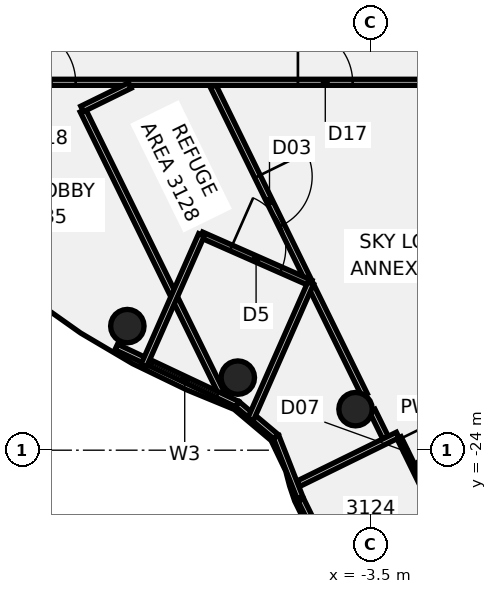
"""IFC4 building model, lengths in metres.
Left out: names, types, materials, properties, quantities, classifications, styles, units other than length and angle.
Written with IfcOpenShell. Run it as: python <this file> out.ifc"""

import sys

from ifc_helpers import new_model, si_unit, direction, frame, frame_2d, origin, origin_2d, place, context, subcontext, project, spatial, rectangle, circle, extrude, element, fill, save


model = new_model("IFC4")
c1 = context("Model", 3, precision=1e-05, world=origin(), true_north=direction((0.0, 1.0)))
c2 = subcontext(c1, "Body", "Model", "MODEL_VIEW")
j1 = project(units=[si_unit("LENGTHUNIT", "METRE"), si_unit("PLANEANGLEUNIT", "RADIAN")], contexts=[c1])
p1 = place(None, origin())
s1 = spatial("IfcSite", under=j1, at=p1, CompositionType="ELEMENT")
p2 = place(p1, origin())
s2 = spatial("IfcBuilding", under=s1, at=p2, CompositionType="ELEMENT")
p3 = place(p2, frame((0.0, 0.0, 128.5)))
s3 = spatial("IfcBuildingStorey", under=s2, at=p3, CompositionType="ELEMENT", Elevation=128.5)
for number, where, z_axis, x_axis in (
    (1, (-11.5, -19.919, -0.18), (0.0, 0.0, 1.0), (1.0, 0.0, 0.0)),
    (2, (-7.866, -21.613, -0.18), (0.0, 0.0, 1.0), (1.0, 0.0, 0.0)),
    (3, (-3.994, -22.651, -0.18), (0.0, 0.0, 1.0), (1.0, 0.0, 0.0)),
):
    element("IfcColumn", number, at=place(p3, frame(where, z_axis=z_axis, x_axis=x_axis)), inside=s3, PredefinedType="COLUMN", context=c2, shape_type="SweptSolid", body=[
        extrude(circle(Radius=0.55, at=origin_2d()), origin(), (0.0, 0.0, 1.0), 4.54),
    ])
p4 = place(p3, frame((-12.961, -12.83, 0.0), z_axis=(0.0, 0.0, 1.0), x_axis=(0.44020582269, -0.897896894788, 0.0)))
e4 = element("IfcWall", 4, at=p4, inside=s3, PredefinedType="PARTITIONING", context=c2, shape_type="SweptSolid", body=[
    extrude(rectangle(XDim=10.402, YDim=0.2, at=frame_2d((5.201, 0.0))), origin(), (0.0, 0.0, 1.0), 3.66),
])
p5 = place(p3, frame((-8.677, -12.026, 0.0), z_axis=(0.0, 0.0, 1.0), x_axis=(0.440258895861, -0.897870873018, 0.0)))
e5 = element("IfcWall", 5, at=p5, inside=s3, PredefinedType="PARTITIONING", context=c2, shape_type="SweptSolid", body=[
    extrude(rectangle(XDim=11.312, YDim=0.2, at=frame_2d((5.656, 0.0))), origin(), (0.0, 0.0, 1.0), 3.66),
])
p6 = place(p5, frame((3.31, 0.0, 0.0)))
e6 = element("IfcOpeningElement", 6, at=p6, cuts=e5, PredefinedType="OPENING", context=c2, shape_type="SweptSolid", body=[
    extrude(rectangle(XDim=1.8, YDim=2.1, at=frame_2d((0.9, 1.05))), frame((0.0, 0.11, 0.0), z_axis=(0.0, -1.0, 0.0), x_axis=(1.0, 0.0, 0.0)), (0.0, 0.0, 1.0), 0.22),
])
p7 = place(p3, frame((-3.446, -22.695, 0.0), z_axis=(0.0, 0.0, 1.0), x_axis=(0.440211677145, -0.89789402454, 0.0)))
e7 = element("IfcWall", 7, at=p7, inside=s3, PredefinedType="PARTITIONING", context=c2, shape_type="SweptSolid", body=[
    extrude(rectangle(XDim=0.992, YDim=0.2, at=frame_2d((0.496, 0.0))), origin(), (0.0, 0.0, 1.0), 3.66),
])
p8 = place(p3, frame((-2.562, -23.59, 0.0), z_axis=(0.0, 0.0, 1.0), x_axis=(0.440221907821, -0.897889008661, 0.0)))
e8 = element("IfcWall", 8, at=p8, inside=s3, PredefinedType="PARTITIONING", context=c2, shape_type="SweptSolid", body=[
    extrude(rectangle(XDim=3.401, YDim=0.15, at=frame_2d((1.7, 0.0))), origin(), (0.0, 0.0, 1.0), 3.66),
])
p9 = place(p8, frame((0.05, 0.0, 0.0)))
e9 = element("IfcOpeningElement", 9, at=p9, cuts=e8, PredefinedType="OPENING", context=c2, shape_type="SweptSolid", body=[
    extrude(rectangle(XDim=0.9, YDim=2.1, at=frame_2d((0.45, 1.05))), frame((0.0, 0.085, 0.0), z_axis=(0.0, -1.0, 0.0), x_axis=(1.0, 0.0, 0.0)), (0.0, 0.0, 1.0), 0.17),
])
p10 = place(p3, frame((-17.1, -11.9, 0.0), z_axis=(0.0, 0.0, 1.0), x_axis=(1.0, 0.0, 0.0)))
e10 = element("IfcWall", 10, at=p10, inside=s3, PredefinedType="PARTITIONING", context=c2, shape_type="SweptSolid", body=[
    extrude(rectangle(XDim=34.145, YDim=0.2, at=frame_2d((17.073, 0.0))), origin(), (0.0, 0.0, 1.0), 3.66),
])
p11 = place(p10, frame((11.211, 0.0, 0.0)))
e11 = element("IfcOpeningElement", 11, at=p11, cuts=e10, PredefinedType="OPENING", context=c2, shape_type="SweptSolid", body=[
    extrude(rectangle(XDim=1.8, YDim=2.1, at=frame_2d((0.9, 1.05))), frame((0.0, 0.11, 0.0), z_axis=(0.0, -1.0, 0.0), x_axis=(1.0, 0.0, 0.0)), (0.0, 0.0, 1.0), 0.22),
])
p12 = place(p10, frame((2.1, 0.0, 0.0)))
e12 = element("IfcOpeningElement", 12, at=p12, cuts=e10, PredefinedType="OPENING", context=c2, shape_type="SweptSolid", body=[
    extrude(rectangle(XDim=1.8, YDim=2.1, at=frame_2d((0.9, 1.05))), frame((0.0, 0.11, 0.0), z_axis=(0.0, -1.0, 0.0), x_axis=(1.0, 0.0, 0.0)), (0.0, 0.0, 1.0), 0.22),
])
p13 = place(p10, frame((26.462, 0.0, 0.0)))
e13 = element("IfcOpeningElement", 13, at=p13, cuts=e10, PredefinedType="OPENING", context=c2, shape_type="SweptSolid", body=[
    extrude(rectangle(XDim=1.8, YDim=2.1, at=frame_2d((0.9, 1.05))), frame((0.0, 0.11, 0.0), z_axis=(0.0, -1.0, 0.0), x_axis=(1.0, 0.0, 0.0)), (0.0, 0.0, 1.0), 0.22),
])
p14 = place(p3, frame((-12.987, -12.776, 0.0), z_axis=(0.0, 0.0, 1.0), x_axis=(0.897834179061, 0.440333722204, 0.0)))
e14 = element("IfcWall", 14, at=p14, inside=s3, PredefinedType="PARTITIONING", context=c2, shape_type="SweptSolid", body=[
    extrude(rectangle(XDim=1.749, YDim=0.2, at=frame_2d((0.875, 0.0))), origin(), (0.0, 0.0, 1.0), 3.66),
])
p15 = place(p3, frame((-5.87, -25.102, 0.0), z_axis=(0.0, 0.0, 1.0), x_axis=(0.897759350726, 0.440486263333, 0.0)))
e15 = element("IfcWall", 15, at=p15, inside=s3, PredefinedType="PARTITIONING", context=c2, shape_type="SweptSolid", body=[
    extrude(rectangle(XDim=3.636, YDim=0.2, at=frame_2d((1.818, 0.0))), origin(), (0.0, 0.0, 1.0), 3.66),
])
p16 = place(p3, frame((-4.342, -28.361, 0.0), z_axis=(0.0, 0.0, 1.0), x_axis=(0.89785648862, 0.440288230416, 0.0)))
e16 = element("IfcWall", 16, at=p16, inside=s3, PredefinedType="PARTITIONING", context=c2, shape_type="SweptSolid", body=[
    extrude(rectangle(XDim=14.199, YDim=0.2, at=frame_2d((7.1, 0.0))), origin(), (0.0, 0.0, 1.0), 3.66),
])
p17 = place(p16, frame((5.8, 0.0, 0.0)))
e17 = element("IfcOpeningElement", 17, at=p17, cuts=e16, PredefinedType="OPENING", context=c2, shape_type="SweptSolid", body=[
    extrude(rectangle(XDim=1.4, YDim=2.1, at=frame_2d((0.7, 1.05))), frame((0.0, 0.11, 0.0), z_axis=(0.0, -1.0, 0.0), x_axis=(1.0, 0.0, 0.0)), (0.0, 0.0, 1.0), 0.22),
])
p18 = place(p3, frame((-2.01, -24.545, 0.0), z_axis=(0.0, 0.0, 1.0), x_axis=(0.897737840771, 0.440530100275, 0.0)))
e18 = element("IfcWall", 18, at=p18, inside=s3, PredefinedType="PARTITIONING", context=c2, shape_type="SweptSolid", body=[
    extrude(rectangle(XDim=1.625, YDim=0.15, at=frame_2d((0.812, 0.0))), origin(), (0.0, 0.0, 1.0), 3.66),
])
p19 = place(p3, frame((-11.865, -20.605, 0.0), z_axis=(0.0, 0.0, 1.0), x_axis=(0.904385974053, -0.426715373448, 0.0)))
e19 = element("IfcWall", 19, at=p19, inside=s3, PredefinedType="SOLIDWALL", context=c2, shape_type="SweptSolid", body=[
    extrude(rectangle(XDim=4.403, YDim=0.2, at=frame_2d((2.202, 0.0))), origin(), (0.0, 0.0, 1.0), 4.36),
])
p20 = place(p19, frame((1.29, 0.0, 1.4)))
e20 = element("IfcOpeningElement", 20, at=p20, cuts=e19, PredefinedType="OPENING", context=c2, shape_type="SweptSolid", body=[
    extrude(rectangle(XDim=2.4, YDim=2.1, at=frame_2d((1.2, 1.05))), frame((0.0, 0.11, 0.0), z_axis=(0.0, -1.0, 0.0), x_axis=(1.0, 0.0, 0.0)), (0.0, 0.0, 1.0), 0.22),
])
p21 = place(p3, frame((-7.882, -22.484, 0.0), z_axis=(0.0, 0.0, 1.0), x_axis=(0.765040402091, -0.643982284825, 0.0)))
e21 = element("IfcWall", 21, at=p21, inside=s3, PredefinedType="SOLIDWALL", context=c2, shape_type="SweptSolid", body=[
    extrude(rectangle(XDim=1.666, YDim=0.2, at=frame_2d((0.833, 0.0))), origin(), (0.0, 0.0, 1.0), 4.36),
])
p22 = place(p3, frame((-6.608, -23.557, 0.0), z_axis=(0.0, 0.0, 1.0), x_axis=(0.364931951145, -0.931034194342, 0.0)))
e22 = element("IfcWall", 22, at=p22, inside=s3, PredefinedType="SOLIDWALL", context=c2, shape_type="SweptSolid", body=[
    extrude(rectangle(XDim=2.16, YDim=0.2, at=frame_2d((1.08, 0.0))), origin(), (0.0, 0.0, 1.0), 4.36),
])
p23 = place(p3, frame((-5.792, -25.632, 0.0), z_axis=(0.0, 0.0, 1.0), x_axis=(0.440299885466, -0.897850773157, 0.0)))
e23 = element("IfcWall", 23, at=p23, inside=s3, PredefinedType="SOLIDWALL", context=c2, shape_type="SweptSolid", body=[
    extrude(rectangle(XDim=3.057, YDim=0.2, at=frame_2d((1.528, 0.0))), origin(), (0.0, 0.0, 1.0), 4.36),
])
p24 = place(p3, frame((-9.061, -16.918, 0.0), z_axis=(0.0, 0.0, 1.0), x_axis=(0.914869848832, -0.403748881978, 0.0)))
e24 = element("IfcWall", 24, at=p24, inside=s3, PredefinedType="SOLIDWALL", context=c2, shape_type="SweptSolid", body=[
    extrude(rectangle(XDim=3.927, YDim=0.2, at=frame_2d((1.963, 0.0))), origin(), (0.0, 0.0, 1.0), 4.36),
])
p25 = place(p24, frame((1.063, 0.0, 0.0)))
e25 = element("IfcOpeningElement", 25, at=p25, cuts=e24, PredefinedType="OPENING", context=c2, shape_type="SweptSolid", body=[
    extrude(rectangle(XDim=1.8, YDim=2.4, at=frame_2d((0.9, 1.2))), frame((0.0, 0.11, 0.0), z_axis=(0.0, -1.0, 0.0), x_axis=(1.0, 0.0, 0.0)), (0.0, 0.0, 1.0), 0.22),
])
p26 = place(p3, frame((-9.062, -16.918, 0.0), z_axis=(0.0, 0.0, 1.0), x_axis=(-0.403733506443, -0.914876634184, 0.0)))
e26 = element("IfcWall", 26, at=p26, inside=s3, PredefinedType="SOLIDWALL", context=c2, shape_type="SweptSolid", body=[
    extrude(rectangle(XDim=4.703, YDim=0.2, at=frame_2d((2.352, 0.0))), origin(), (0.0, 0.0, 1.0), 4.36),
])
p27 = place(p3, frame((-5.469, -18.503, 0.0), z_axis=(0.0, 0.0, 1.0), x_axis=(-0.403691721509, -0.914895072664, 0.0)))
e27 = element("IfcWall", 27, at=p27, inside=s3, PredefinedType="SOLIDWALL", context=c2, shape_type="SweptSolid", body=[
    extrude(rectangle(XDim=4.9, YDim=0.2, at=frame_2d((2.45, 0.0))), origin(), (0.0, 0.0, 1.0), 4.36),
])
p28 = place(p6, frame((1.8, 0.0, 0.0), z_axis=(0.0, 0.0, 1.0), x_axis=(-1.0, 0.0, 0.0)))
e28 = element("IfcDoor", 28, at=p28, inside=s3, OperationType="DOUBLE_DOOR_SINGLE_SWING", PredefinedType="DOOR", context=c2, shape_type="SweptSolid", body=[
    extrude(rectangle(XDim=1.8, YDim=2.1, at=frame_2d((0.9, 1.05))), frame((0.0, 0.025, 0.0), z_axis=(0.0, -1.0, 0.0), x_axis=(1.0, 0.0, 0.0)), (0.0, 0.0, 1.0), 0.05),
])
fill(e6, e28)
p29 = place(p9, frame((0.9, 0.0, 0.0), z_axis=(0.0, 0.0, 1.0), x_axis=(-1.0, 0.0, 0.0)))
e29 = element("IfcDoor", 29, at=p29, inside=s3, OperationType="SINGLE_SWING_LEFT", PredefinedType="DOOR", context=c2, shape_type="SweptSolid", body=[
    extrude(rectangle(XDim=0.9, YDim=2.1, at=frame_2d((0.45, 1.05))), frame((0.0, 0.025, 0.0), z_axis=(0.0, -1.0, 0.0), x_axis=(1.0, 0.0, 0.0)), (0.0, 0.0, 1.0), 0.05),
])
fill(e9, e29)
p30 = place(p11, origin())
e30 = element("IfcDoor", 30, at=p30, inside=s3, OperationType="DOUBLE_DOOR_SINGLE_SWING", PredefinedType="DOOR", context=c2, shape_type="SweptSolid", body=[
    extrude(rectangle(XDim=1.8, YDim=2.1, at=frame_2d((0.9, 1.05))), frame((0.0, 0.025, 0.0), z_axis=(0.0, -1.0, 0.0), x_axis=(1.0, 0.0, 0.0)), (0.0, 0.0, 1.0), 0.05),
])
fill(e11, e30)
p31 = place(p12, origin())
e31 = element("IfcDoor", 31, at=p31, inside=s3, OperationType="DOUBLE_DOOR_SINGLE_SWING", PredefinedType="DOOR", context=c2, shape_type="SweptSolid", body=[
    extrude(rectangle(XDim=1.8, YDim=2.1, at=frame_2d((0.9, 1.05))), frame((0.0, 0.025, 0.0), z_axis=(0.0, -1.0, 0.0), x_axis=(1.0, 0.0, 0.0)), (0.0, 0.0, 1.0), 0.05),
])
fill(e12, e31)
p32 = place(p20, origin())
e32 = element("IfcWindow", 32, at=p32, inside=s3, PartitioningType="SINGLE_PANEL", PredefinedType="WINDOW", context=c2, shape_type="SweptSolid", body=[
    extrude(rectangle(XDim=2.4, YDim=2.1, at=frame_2d((1.2, 1.05))), frame((0.0, 0.03, 0.0), z_axis=(0.0, -1.0, 0.0), x_axis=(1.0, 0.0, 0.0)), (0.0, 0.0, 1.0), 0.06),
])
fill(e20, e32)
p33 = place(p25, origin())
e33 = element("IfcDoor", 33, at=p33, inside=s3, OperationType="SINGLE_SWING_LEFT", PredefinedType="DOOR", context=c2, shape_type="SweptSolid", body=[
    extrude(rectangle(XDim=1.8, YDim=2.4, at=frame_2d((0.9, 1.2))), frame((0.0, 0.025, 0.0), z_axis=(0.0, -1.0, 0.0), x_axis=(1.0, 0.0, 0.0)), (0.0, 0.0, 1.0), 0.05),
])
fill(e25, e33)
save(model, sys.argv[1])
